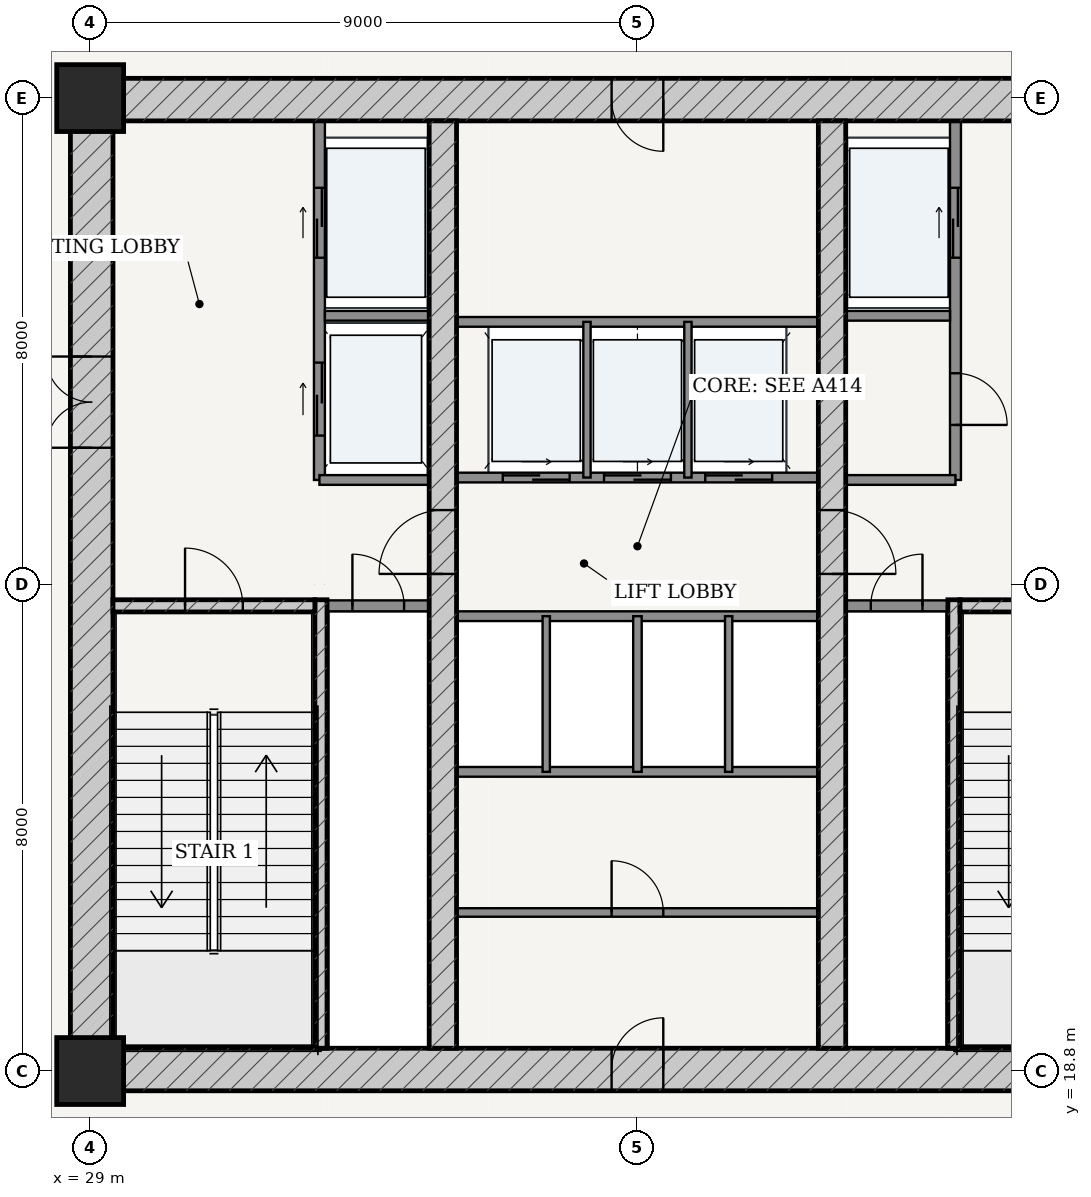
"""IFC4 building model, lengths in metres.
Left out: names, types, materials, properties, quantities, classifications, styles, units other than length and angle.
Written with IfcOpenShell. Run it as: python <this file> out.ifc"""

import sys

from ifc_helpers import new_model, si_unit, direction, frame, frame_2d, origin, origin_2d, place, context, subcontext, project, spatial, rectangle, extrude, source, transform, mapped, element, fill, save


model = new_model("IFC4")
c1 = context("Model", 3, precision=1e-05, world=origin(), true_north=direction((-0.2419218956, 0.970295726276)))
c2 = subcontext(c1, "Body", "Model", "MODEL_VIEW")
j1 = project(units=[si_unit("LENGTHUNIT", "METRE"), si_unit("PLANEANGLEUNIT", "RADIAN")], contexts=[c1])
p1 = place(None, origin())
s1 = spatial("IfcSite", under=j1, at=p1, CompositionType="ELEMENT")
p2 = place(p1, origin())
s2 = spatial("IfcBuilding", under=s1, at=p2, CompositionType="ELEMENT")
p3 = place(p2, frame((0.0, 0.0, 74.4)))
s3 = spatial("IfcBuildingStorey", under=s2, at=p3, CompositionType="ELEMENT", Elevation=74.4)
for number, where, z_axis, x_axis in (
    (1, (29.0, 18.8, 0.0), (0.0, 0.0, 1.0), (1.0, 0.0, 0.0)),
    (2, (29.0, 34.8, 0.0), (0.0, 0.0, 1.0), (1.0, 0.0, 0.0)),
):
    element("IfcColumn", number, at=place(p3, frame(where, z_axis=z_axis, x_axis=x_axis)), inside=s3, PredefinedType="COLUMN", context=c2, shape_type="SweptSolid", body=[
        extrude(rectangle(XDim=1.1, YDim=1.1, at=origin_2d()), origin(), (0.0, 0.0, 1.0), 5.4),
    ])
p4 = place(p3, frame((28.675, 18.825, 0.0), z_axis=(0.0, 0.0, 1.0), x_axis=(1.0, 0.0, 0.0)))
e3 = element("IfcWall", 3, at=p4, inside=s3, PredefinedType="SHEAR", context=c2, shape_type="SweptSolid", body=[
    extrude(rectangle(XDim=18.65, YDim=0.7, at=frame_2d((9.325, 0.0))), origin(), (0.0, 0.0, 1.0), 5.125),
])
p5 = place(p4, frame((8.9, 0.0, 0.0)))
e4 = element("IfcOpeningElement", 4, at=p5, cuts=e3, PredefinedType="OPENING", context=c2, shape_type="SweptSolid", body=[
    extrude(rectangle(XDim=0.85, YDim=2.1, at=frame_2d((0.425, 1.05))), frame((0.0, 0.36, 0.0), z_axis=(0.0, -1.0, 0.0), x_axis=(1.0, 0.0, 0.0)), (0.0, 0.0, 1.0), 0.72),
])
p6 = place(p3, frame((28.675, 34.775, 0.0), z_axis=(0.0, 0.0, 1.0), x_axis=(1.0, 0.0, 0.0)))
e5 = element("IfcWall", 5, at=p6, inside=s3, PredefinedType="SHEAR", context=c2, shape_type="SweptSolid", body=[
    extrude(rectangle(XDim=18.65, YDim=0.7, at=frame_2d((9.325, 0.0))), origin(), (0.0, 0.0, 1.0), 5.125),
])
p7 = place(p6, frame((8.9, 0.0, 0.0)))
e6 = element("IfcOpeningElement", 6, at=p7, cuts=e5, PredefinedType="OPENING", context=c2, shape_type="SweptSolid", body=[
    extrude(rectangle(XDim=0.85, YDim=2.1, at=frame_2d((0.425, 1.05))), frame((0.0, 0.36, 0.0), z_axis=(0.0, -1.0, 0.0), x_axis=(1.0, 0.0, 0.0)), (0.0, 0.0, 1.0), 0.72),
])
p8 = place(p3, frame((29.025, 19.175, 0.0), z_axis=(0.0, 0.0, 1.0), x_axis=(0.0, 1.0, 0.0)))
e7 = element("IfcWall", 7, at=p8, inside=s3, PredefinedType="SHEAR", context=c2, shape_type="SweptSolid", body=[
    extrude(rectangle(XDim=15.25, YDim=0.7, at=frame_2d((7.625, 0.0))), origin(), (0.0, 0.0, 1.0), 5.125),
])
p9 = place(p8, frame((9.875, 0.0, 0.0)))
e8 = element("IfcOpeningElement", 8, at=p9, cuts=e7, PredefinedType="OPENING", context=c2, shape_type="SweptSolid", body=[
    extrude(rectangle(XDim=1.5, YDim=2.2, at=frame_2d((0.75, 1.1))), frame((0.0, 0.36, 0.0), z_axis=(0.0, -1.0, 0.0), x_axis=(1.0, 0.0, 0.0)), (0.0, 0.0, 1.0), 0.72),
])
p10 = place(p3, frame((32.795, 19.175, 0.0), z_axis=(0.0, 0.0, 1.0), x_axis=(0.0, 1.0, 0.0)))
e9 = element("IfcWall", 9, at=p10, inside=s3, PredefinedType="SOLIDWALL", context=c2, shape_type="SweptSolid", body=[
    extrude(rectangle(XDim=7.375, YDim=0.2, at=frame_2d((3.688, 0.0))), origin(), (0.0, 0.0, 1.0), 5.125),
])
p11 = place(p3, frame((29.375, 26.45, 0.0), z_axis=(0.0, 0.0, 1.0), x_axis=(1.0, 0.0, 0.0)))
e10 = element("IfcWall", 10, at=p11, inside=s3, PredefinedType="SOLIDWALL", context=c2, shape_type="SweptSolid", body=[
    extrude(rectangle(XDim=3.32, YDim=0.2, at=frame_2d((1.66, 0.0))), origin(), (0.0, 0.0, 1.0), 5.125),
])
p12 = place(p11, frame((1.185, 0.0, 0.0)))
e11 = element("IfcOpeningElement", 11, at=p12, cuts=e10, PredefinedType="OPENING", context=c2, shape_type="SweptSolid", body=[
    extrude(rectangle(XDim=0.95, YDim=2.15, at=frame_2d((0.475, 1.075))), frame((0.0, 0.11, 0.0), z_axis=(0.0, -1.0, 0.0), x_axis=(1.0, 0.0, 0.0)), (0.0, 0.0, 1.0), 0.22),
])
p13 = place(p3, frame((43.205, 19.175, 0.0), z_axis=(0.0, 0.0, 1.0), x_axis=(0.0, 1.0, 0.0)))
e12 = element("IfcWall", 12, at=p13, inside=s3, PredefinedType="SOLIDWALL", context=c2, shape_type="SweptSolid", body=[
    extrude(rectangle(XDim=7.375, YDim=0.2, at=frame_2d((3.688, 0.0))), origin(), (0.0, 0.0, 1.0), 5.125),
])
p14 = place(p3, frame((43.305, 26.45, 0.0), z_axis=(0.0, 0.0, 1.0), x_axis=(1.0, 0.0, 0.0)))
e13 = element("IfcWall", 13, at=p14, inside=s3, PredefinedType="SOLIDWALL", context=c2, shape_type="SweptSolid", body=[
    extrude(rectangle(XDim=3.32, YDim=0.2, at=frame_2d((1.66, 0.0))), origin(), (0.0, 0.0, 1.0), 5.125),
])
p15 = place(p14, frame((1.185, 0.0, 0.0)))
e14 = element("IfcOpeningElement", 14, at=p15, cuts=e13, PredefinedType="OPENING", context=c2, shape_type="SweptSolid", body=[
    extrude(rectangle(XDim=0.95, YDim=2.15, at=frame_2d((0.475, 1.075))), frame((0.0, 0.11, 0.0), z_axis=(0.0, -1.0, 0.0), x_axis=(1.0, 0.0, 0.0)), (0.0, 0.0, 1.0), 0.22),
])
p16 = place(p3, frame((34.8, 19.175, 0.0), z_axis=(0.0, 0.0, 1.0), x_axis=(0.0, 1.0, 0.0)))
e15 = element("IfcWall", 15, at=p16, inside=s3, PredefinedType="SHEAR", context=c2, shape_type="SweptSolid", body=[
    extrude(rectangle(XDim=15.25, YDim=0.45, at=frame_2d((7.625, 0.0))), origin(), (0.0, 0.0, 1.0), 5.125),
])
p17 = place(p16, frame((7.8, 0.0, 0.0)))
e16 = element("IfcOpeningElement", 16, at=p17, cuts=e15, PredefinedType="OPENING", context=c2, shape_type="SweptSolid", body=[
    extrude(rectangle(XDim=1.05, YDim=2.15, at=frame_2d((0.525, 1.075))), frame((0.0, 0.235, 0.0), z_axis=(0.0, -1.0, 0.0), x_axis=(1.0, 0.0, 0.0)), (0.0, 0.0, 1.0), 0.47),
])
p18 = place(p3, frame((41.2, 19.175, 0.0), z_axis=(0.0, 0.0, 1.0), x_axis=(0.0, 1.0, 0.0)))
e17 = element("IfcWall", 17, at=p18, inside=s3, PredefinedType="SHEAR", context=c2, shape_type="SweptSolid", body=[
    extrude(rectangle(XDim=15.25, YDim=0.45, at=frame_2d((7.625, 0.0))), origin(), (0.0, 0.0, 1.0), 5.125),
])
p19 = place(p18, frame((7.8, 0.0, 0.0)))
e18 = element("IfcOpeningElement", 18, at=p19, cuts=e17, PredefinedType="OPENING", context=c2, shape_type="SweptSolid", body=[
    extrude(rectangle(XDim=1.05, YDim=2.15, at=frame_2d((0.525, 1.075))), frame((0.0, 0.235, 0.0), z_axis=(0.0, -1.0, 0.0), x_axis=(1.0, 0.0, 0.0)), (0.0, 0.0, 1.0), 0.47),
])
p20 = place(p3, frame((32.9, 26.45, 0.0), z_axis=(0.0, 0.0, 1.0), x_axis=(1.0, 0.0, 0.0)))
e19 = element("IfcWall", 19, at=p20, inside=s3, PredefinedType="PARTITIONING", context=c2, shape_type="SweptSolid", body=[
    extrude(rectangle(XDim=1.675, YDim=0.18, at=frame_2d((0.837, 0.0))), origin(), (0.0, 0.0, 1.0), 5.125),
])
p21 = place(p20, frame((0.413, 0.0, 0.0)))
e20 = element("IfcOpeningElement", 20, at=p21, cuts=e19, PredefinedType="OPENING", context=c2, shape_type="SweptSolid", body=[
    extrude(rectangle(XDim=0.85, YDim=2.1, at=frame_2d((0.425, 1.05))), frame((0.0, 0.1, 0.0), z_axis=(0.0, -1.0, 0.0), x_axis=(1.0, 0.0, 0.0)), (0.0, 0.0, 1.0), 0.2),
])
p22 = place(p3, frame((41.425, 26.45, 0.0), z_axis=(0.0, 0.0, 1.0), x_axis=(1.0, 0.0, 0.0)))
e21 = element("IfcWall", 21, at=p22, inside=s3, PredefinedType="PARTITIONING", context=c2, shape_type="SweptSolid", body=[
    extrude(rectangle(XDim=1.675, YDim=0.18, at=frame_2d((0.837, 0.0))), origin(), (0.0, 0.0, 1.0), 5.125),
])
p23 = place(p22, frame((0.413, 0.0, 0.0)))
e22 = element("IfcOpeningElement", 22, at=p23, cuts=e21, PredefinedType="OPENING", context=c2, shape_type="SweptSolid", body=[
    extrude(rectangle(XDim=0.85, YDim=2.1, at=frame_2d((0.425, 1.05))), frame((0.0, 0.1, 0.0), z_axis=(0.0, -1.0, 0.0), x_axis=(1.0, 0.0, 0.0)), (0.0, 0.0, 1.0), 0.2),
])
p24 = place(p3, frame((32.77, 28.52, 0.0), z_axis=(0.0, 0.0, 1.0), x_axis=(0.0, 1.0, 0.0)))
e23 = element("IfcWall", 23, at=p24, inside=s3, PredefinedType="PARTITIONING", context=c2, shape_type="SweptSolid", body=[
    extrude(rectangle(XDim=5.905, YDim=0.18, at=frame_2d((2.953, 0.0))), origin(), (0.0, 0.0, 1.0), 5.125),
])
p25 = place(p24, frame((3.655, 0.0, 0.0)))
e24 = element("IfcOpeningElement", 24, at=p25, cuts=e23, PredefinedType="OPENING", context=c2, shape_type="SweptSolid", body=[
    extrude(rectangle(XDim=1.15, YDim=2.2, at=frame_2d((0.575, 1.1))), frame((0.0, 0.1, 0.0), z_axis=(0.0, -1.0, 0.0), x_axis=(1.0, 0.0, 0.0)), (0.0, 0.0, 1.0), 0.2),
])
p26 = place(p24, frame((0.73, 0.0, 0.0)))
e25 = element("IfcOpeningElement", 25, at=p26, cuts=e23, PredefinedType="OPENING", context=c2, shape_type="SweptSolid", body=[
    extrude(rectangle(XDim=1.2, YDim=2.25, at=frame_2d((0.6, 1.125))), frame((0.0, 0.1, 0.0), z_axis=(0.0, -1.0, 0.0), x_axis=(1.0, 0.0, 0.0)), (0.0, 0.0, 1.0), 0.2),
])
p27 = place(p3, frame((32.86, 31.22, 0.0), z_axis=(0.0, 0.0, 1.0), x_axis=(1.0, 0.0, 0.0)))
e26 = element("IfcWall", 26, at=p27, inside=s3, PredefinedType="PARTITIONING", context=c2, shape_type="SweptSolid", body=[
    extrude(rectangle(XDim=1.715, YDim=0.16, at=frame_2d((0.857, 0.0))), origin(), (0.0, 0.0, 1.0), 5.125),
])
p28 = place(p3, frame((32.77, 28.52, 0.0), z_axis=(0.0, 0.0, 1.0), x_axis=(1.0, 0.0, 0.0)))
e27 = element("IfcWall", 27, at=p28, inside=s3, PredefinedType="PARTITIONING", context=c2, shape_type="SweptSolid", body=[
    extrude(rectangle(XDim=1.805, YDim=0.16, at=frame_2d((0.902, 0.0))), origin(), (0.0, 0.0, 1.0), 5.125),
])
p29 = place(p3, frame((43.23, 28.52, 0.0), z_axis=(0.0, 0.0, 1.0), x_axis=(0.0, 1.0, 0.0)))
e28 = element("IfcWall", 28, at=p29, inside=s3, PredefinedType="PARTITIONING", context=c2, shape_type="SweptSolid", body=[
    extrude(rectangle(XDim=5.905, YDim=0.18, at=frame_2d((2.953, 0.0))), origin(), (0.0, 0.0, 1.0), 5.125),
])
p30 = place(p29, frame((0.905, 0.0, 0.0)))
e29 = element("IfcOpeningElement", 29, at=p30, cuts=e28, PredefinedType="OPENING", context=c2, shape_type="SweptSolid", body=[
    extrude(rectangle(XDim=0.85, YDim=2.1, at=frame_2d((0.425, 1.05))), frame((0.0, 0.1, 0.0), z_axis=(0.0, -1.0, 0.0), x_axis=(1.0, 0.0, 0.0)), (0.0, 0.0, 1.0), 0.2),
])
p31 = place(p29, frame((3.655, 0.0, 0.0)))
e30 = element("IfcOpeningElement", 30, at=p31, cuts=e28, PredefinedType="OPENING", context=c2, shape_type="SweptSolid", body=[
    extrude(rectangle(XDim=1.15, YDim=2.2, at=frame_2d((0.575, 1.1))), frame((0.0, 0.1, 0.0), z_axis=(0.0, -1.0, 0.0), x_axis=(1.0, 0.0, 0.0)), (0.0, 0.0, 1.0), 0.2),
])
p32 = place(p3, frame((41.425, 31.22, 0.0), z_axis=(0.0, 0.0, 1.0), x_axis=(1.0, 0.0, 0.0)))
e31 = element("IfcWall", 31, at=p32, inside=s3, PredefinedType="PARTITIONING", context=c2, shape_type="SweptSolid", body=[
    extrude(rectangle(XDim=1.715, YDim=0.16, at=frame_2d((0.857, 0.0))), origin(), (0.0, 0.0, 1.0), 5.125),
])
p33 = place(p3, frame((41.425, 28.52, 0.0), z_axis=(0.0, 0.0, 1.0), x_axis=(1.0, 0.0, 0.0)))
e32 = element("IfcWall", 32, at=p33, inside=s3, PredefinedType="PARTITIONING", context=c2, shape_type="SweptSolid", body=[
    extrude(rectangle(XDim=1.805, YDim=0.16, at=frame_2d((0.902, 0.0))), origin(), (0.0, 0.0, 1.0), 5.125),
])
p34 = place(p3, frame((35.025, 28.56, 0.0), z_axis=(0.0, 0.0, 1.0), x_axis=(1.0, 0.0, 0.0)))
e33 = element("IfcWall", 33, at=p34, inside=s3, PredefinedType="PARTITIONING", context=c2, shape_type="SweptSolid", body=[
    extrude(rectangle(XDim=5.95, YDim=0.16, at=frame_2d((2.975, 0.0))), origin(), (0.0, 0.0, 1.0), 5.125),
])
p35 = place(p34, frame((0.76, 0.0, 0.0)))
e34 = element("IfcOpeningElement", 34, at=p35, cuts=e33, PredefinedType="OPENING", context=c2, shape_type="SweptSolid", body=[
    extrude(rectangle(XDim=1.1, YDim=2.2, at=frame_2d((0.55, 1.1))), frame((0.0, 0.09, 0.0), z_axis=(0.0, -1.0, 0.0), x_axis=(1.0, 0.0, 0.0)), (0.0, 0.0, 1.0), 0.18),
])
p36 = place(p34, frame((2.425, 0.0, 0.0)))
e35 = element("IfcOpeningElement", 35, at=p36, cuts=e33, PredefinedType="OPENING", context=c2, shape_type="SweptSolid", body=[
    extrude(rectangle(XDim=1.1, YDim=2.2, at=frame_2d((0.55, 1.1))), frame((0.0, 0.09, 0.0), z_axis=(0.0, -1.0, 0.0), x_axis=(1.0, 0.0, 0.0)), (0.0, 0.0, 1.0), 0.18),
])
p37 = place(p34, frame((4.09, 0.0, 0.0)))
e36 = element("IfcOpeningElement", 36, at=p37, cuts=e33, PredefinedType="OPENING", context=c2, shape_type="SweptSolid", body=[
    extrude(rectangle(XDim=1.1, YDim=2.2, at=frame_2d((0.55, 1.1))), frame((0.0, 0.09, 0.0), z_axis=(0.0, -1.0, 0.0), x_axis=(1.0, 0.0, 0.0)), (0.0, 0.0, 1.0), 0.18),
])
p38 = place(p3, frame((35.025, 31.12, 0.0), z_axis=(0.0, 0.0, 1.0), x_axis=(1.0, 0.0, 0.0)))
e37 = element("IfcWall", 37, at=p38, inside=s3, PredefinedType="PARTITIONING", context=c2, shape_type="SweptSolid", body=[
    extrude(rectangle(XDim=5.95, YDim=0.16, at=frame_2d((2.975, 0.0))), origin(), (0.0, 0.0, 1.0), 5.125),
])
for number, where, z_axis, x_axis in (
    (38, (37.17, 28.56, 0.0), (0.0, 0.0, 1.0), (0.0, 1.0, 0.0)),
    (39, (38.83, 28.56, 0.0), (0.0, 0.0, 1.0), (0.0, 1.0, 0.0)),
):
    element("IfcWall", number, at=place(p3, frame(where, z_axis=z_axis, x_axis=x_axis)), inside=s3, PredefinedType="PARTITIONING", context=c2, shape_type="SweptSolid", body=[
        extrude(rectangle(XDim=2.56, YDim=0.12, at=frame_2d((1.28, 0.0))), origin(), (0.0, 0.0, 1.0), 5.125),
    ])
for number, where, z_axis, x_axis in (
    (40, (35.025, 26.28, 0.0), (0.0, 0.0, 1.0), (1.0, 0.0, 0.0)),
    (41, (35.025, 23.72, 0.0), (0.0, 0.0, 1.0), (1.0, 0.0, 0.0)),
):
    element("IfcWall", number, at=place(p3, frame(where, z_axis=z_axis, x_axis=x_axis)), inside=s3, PredefinedType="PARTITIONING", context=c2, shape_type="SweptSolid", body=[
        extrude(rectangle(XDim=5.95, YDim=0.16, at=frame_2d((2.975, 0.0))), origin(), (0.0, 0.0, 1.0), 5.125),
    ])
p39 = place(p3, frame((36.5, 23.72, 0.0), z_axis=(0.0, 0.0, 1.0), x_axis=(0.0, 1.0, 0.0)))
e42 = element("IfcWall", 42, at=p39, inside=s3, PredefinedType="PARTITIONING", context=c2, shape_type="SweptSolid", body=[
    extrude(rectangle(XDim=2.56, YDim=0.12, at=frame_2d((1.28, 0.0))), origin(), (0.0, 0.0, 1.0), 5.125),
])
p40 = place(p3, frame((38.0, 23.72, 0.0), z_axis=(0.0, 0.0, 1.0), x_axis=(0.0, 1.0, 0.0)))
e43 = element("IfcWall", 43, at=p40, inside=s3, PredefinedType="PARTITIONING", context=c2, shape_type="SweptSolid", body=[
    extrude(rectangle(XDim=2.56, YDim=0.14, at=frame_2d((1.28, 0.0))), origin(), (0.0, 0.0, 1.0), 5.125),
])
p41 = place(p3, frame((39.5, 23.72, 0.0), z_axis=(0.0, 0.0, 1.0), x_axis=(0.0, 1.0, 0.0)))
e44 = element("IfcWall", 44, at=p41, inside=s3, PredefinedType="PARTITIONING", context=c2, shape_type="SweptSolid", body=[
    extrude(rectangle(XDim=2.56, YDim=0.12, at=frame_2d((1.28, 0.0))), origin(), (0.0, 0.0, 1.0), 5.125),
])
p42 = place(p3, frame((35.025, 21.407, 0.0), z_axis=(0.0, 0.0, 1.0), x_axis=(1.0, 0.0, 0.0)))
e45 = element("IfcWall", 45, at=p42, inside=s3, PredefinedType="PARTITIONING", context=c2, shape_type="SweptSolid", body=[
    extrude(rectangle(XDim=5.95, YDim=0.14, at=frame_2d((2.975, 0.0))), origin(), (0.0, 0.0, 1.0), 5.125),
])
p43 = place(p42, frame((2.55, 0.0, 0.0)))
e46 = element("IfcOpeningElement", 46, at=p43, cuts=e45, PredefinedType="OPENING", context=c2, shape_type="SweptSolid", body=[
    extrude(rectangle(XDim=0.85, YDim=2.1, at=frame_2d((0.425, 1.05))), frame((0.0, 0.08, 0.0), z_axis=(0.0, -1.0, 0.0), x_axis=(1.0, 0.0, 0.0)), (0.0, 0.0, 1.0), 0.16),
])
m1 = source(origin(), c2, "Body", "SweptSolid", [
    extrude(rectangle(XDim=1.5, YDim=2.2, at=frame_2d((0.75, 1.1))), frame((0.0, 0.025, 0.0), z_axis=(0.0, -1.0, 0.0), x_axis=(1.0, 0.0, 0.0)), (0.0, 0.0, 1.0), 0.05),
])
p44 = place(p9, origin())
e47 = element("IfcDoor", 47, at=p44, inside=s3, OperationType="DOUBLE_DOOR_SINGLE_SWING", PredefinedType="DOOR", context=c2, shape_type="MappedRepresentation", body=[
    mapped(m1, transform((0.0, 0.0, 0.0), scale=1.0)),
])
fill(e8, e47)
m2 = source(origin(), c2, "Body", "SweptSolid", [
    extrude(rectangle(XDim=1.05, YDim=2.15, at=frame_2d((0.525, 1.075))), frame((0.0, 0.025, 0.0), z_axis=(0.0, -1.0, 0.0), x_axis=(1.0, 0.0, 0.0)), (0.0, 0.0, 1.0), 0.05),
])
p45 = place(p17, origin())
e48 = element("IfcDoor", 48, at=p45, inside=s3, OperationType="SINGLE_SWING_LEFT", PredefinedType="DOOR", context=c2, shape_type="MappedRepresentation", body=[
    mapped(m2, transform((0.0, 0.0, 0.0), scale=1.0)),
])
fill(e16, e48)
p46 = place(p19, frame((1.05, 0.0, 0.0), z_axis=(0.0, 0.0, 1.0), x_axis=(-1.0, 0.0, 0.0)))
e49 = element("IfcDoor", 49, at=p46, inside=s3, OperationType="SINGLE_SWING_RIGHT", PredefinedType="DOOR", context=c2, shape_type="MappedRepresentation", body=[
    mapped(m2, transform((0.0, 0.0, 0.0), scale=1.0)),
])
fill(e18, e49)
m3 = source(origin(), c2, "Body", "SweptSolid", [
    extrude(rectangle(XDim=0.95, YDim=2.15, at=frame_2d((0.475, 1.075))), frame((0.0, 0.025, 0.0), z_axis=(0.0, -1.0, 0.0), x_axis=(1.0, 0.0, 0.0)), (0.0, 0.0, 1.0), 0.05),
])
p47 = place(p12, origin())
e50 = element("IfcDoor", 50, at=p47, inside=s3, OperationType="SINGLE_SWING_LEFT", PredefinedType="DOOR", context=c2, shape_type="MappedRepresentation", body=[
    mapped(m3, transform((0.0, 0.0, 0.0), scale=1.0)),
])
fill(e11, e50)
m4 = source(origin(), c2, "Body", "SweptSolid", [
    extrude(rectangle(XDim=0.85, YDim=2.1, at=frame_2d((0.425, 1.05))), frame((0.0, 0.025, 0.0), z_axis=(0.0, -1.0, 0.0), x_axis=(1.0, 0.0, 0.0)), (0.0, 0.0, 1.0), 0.05),
])
p48 = place(p21, origin())
e51 = element("IfcDoor", 51, at=p48, inside=s3, OperationType="SINGLE_SWING_LEFT", PredefinedType="DOOR", context=c2, shape_type="MappedRepresentation", body=[
    mapped(m4, transform((0.0, 0.0, 0.0), scale=1.0)),
])
fill(e20, e51)
p49 = place(p23, origin())
e52 = element("IfcDoor", 52, at=p49, inside=s3, OperationType="SINGLE_SWING_RIGHT", PredefinedType="DOOR", context=c2, shape_type="MappedRepresentation", body=[
    mapped(m4, transform((0.0, 0.0, 0.0), scale=1.0)),
])
fill(e22, e52)
p50 = place(p30, frame((0.85, 0.0, 0.0), z_axis=(0.0, 0.0, 1.0), x_axis=(-1.0, 0.0, 0.0)))
e53 = element("IfcDoor", 53, at=p50, inside=s3, OperationType="SINGLE_SWING_RIGHT", PredefinedType="DOOR", context=c2, shape_type="MappedRepresentation", body=[
    mapped(m4, transform((0.0, 0.0, 0.0), scale=1.0)),
])
fill(e29, e53)
p51 = place(p7, frame((0.85, 0.0, 0.0), z_axis=(0.0, 0.0, 1.0), x_axis=(-1.0, 0.0, 0.0)))
e54 = element("IfcDoor", 54, at=p51, inside=s3, OperationType="SINGLE_SWING_LEFT", PredefinedType="DOOR", context=c2, shape_type="MappedRepresentation", body=[
    mapped(m4, transform((0.0, 0.0, 0.0), scale=1.0)),
])
fill(e6, e54)
p52 = place(p5, origin())
e55 = element("IfcDoor", 55, at=p52, inside=s3, OperationType="SINGLE_SWING_RIGHT", PredefinedType="DOOR", context=c2, shape_type="MappedRepresentation", body=[
    mapped(m4, transform((0.0, 0.0, 0.0), scale=1.0)),
])
fill(e4, e55)
p53 = place(p43, origin())
e56 = element("IfcDoor", 56, at=p53, inside=s3, OperationType="SINGLE_SWING_LEFT", PredefinedType="DOOR", context=c2, shape_type="MappedRepresentation", body=[
    mapped(m4, transform((0.0, 0.0, 0.0), scale=1.0)),
])
fill(e46, e56)
m5 = source(origin(), c2, "Body", "SweptSolid", [
    extrude(rectangle(XDim=1.15, YDim=2.2, at=frame_2d((0.575, 1.1))), frame((0.0, 0.025, 0.0), z_axis=(0.0, -1.0, 0.0), x_axis=(1.0, 0.0, 0.0)), (0.0, 0.0, 1.0), 0.05),
])
p54 = place(p25, origin())
e57 = element("IfcDoor", 57, at=p54, inside=s3, OperationType="DOUBLE_DOOR_SLIDING", PredefinedType="DOOR", context=c2, shape_type="MappedRepresentation", body=[
    mapped(m5, transform((0.0, 0.0, 0.0), scale=1.0)),
])
fill(e24, e57)
p55 = place(p31, origin())
e58 = element("IfcDoor", 58, at=p55, inside=s3, OperationType="DOUBLE_DOOR_SLIDING", PredefinedType="DOOR", context=c2, shape_type="MappedRepresentation", body=[
    mapped(m5, transform((0.0, 0.0, 0.0), scale=1.0)),
])
fill(e30, e58)
m6 = source(origin(), c2, "Body", "SweptSolid", [
    extrude(rectangle(XDim=1.2, YDim=2.25, at=frame_2d((0.6, 1.125))), frame((0.0, 0.025, 0.0), z_axis=(0.0, -1.0, 0.0), x_axis=(1.0, 0.0, 0.0)), (0.0, 0.0, 1.0), 0.05),
])
p56 = place(p26, origin())
e59 = element("IfcDoor", 59, at=p56, inside=s3, OperationType="DOUBLE_DOOR_SLIDING", PredefinedType="DOOR", context=c2, shape_type="MappedRepresentation", body=[
    mapped(m6, transform((0.0, 0.0, 0.0), scale=1.0)),
])
fill(e25, e59)
m7 = source(origin(), c2, "Body", "SweptSolid", [
    extrude(rectangle(XDim=1.1, YDim=2.2, at=frame_2d((0.55, 1.1))), frame((0.0, 0.025, 0.0), z_axis=(0.0, -1.0, 0.0), x_axis=(1.0, 0.0, 0.0)), (0.0, 0.0, 1.0), 0.05),
])
p57 = place(p35, origin())
e60 = element("IfcDoor", 60, at=p57, inside=s3, OperationType="DOUBLE_DOOR_SLIDING", PredefinedType="DOOR", context=c2, shape_type="MappedRepresentation", body=[
    mapped(m7, transform((0.0, 0.0, 0.0), scale=1.0)),
])
fill(e34, e60)
p58 = place(p36, origin())
e61 = element("IfcDoor", 61, at=p58, inside=s3, OperationType="DOUBLE_DOOR_SLIDING", PredefinedType="DOOR", context=c2, shape_type="MappedRepresentation", body=[
    mapped(m7, transform((0.0, 0.0, 0.0), scale=1.0)),
])
fill(e35, e61)
p59 = place(p37, origin())
e62 = element("IfcDoor", 62, at=p59, inside=s3, OperationType="DOUBLE_DOOR_SLIDING", PredefinedType="DOOR", context=c2, shape_type="MappedRepresentation", body=[
    mapped(m7, transform((0.0, 0.0, 0.0), scale=1.0)),
])
fill(e36, e62)
save(model, sys.argv[1])
